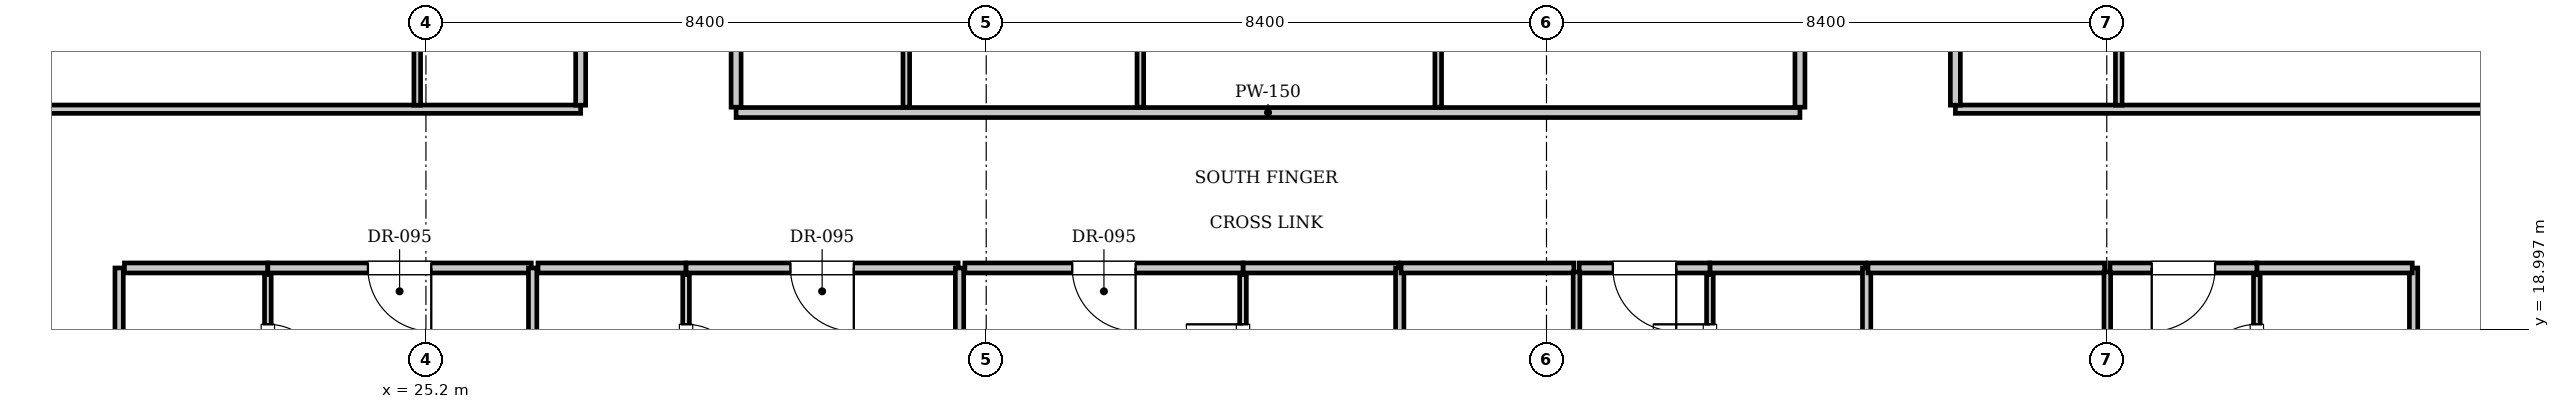
"""IFC4 building model, lengths in metres.
Left out: names, types, materials, properties, quantities, classifications, styles, units other than length and angle.
Written with IfcOpenShell. Run it as: python <this file> out.ifc"""

import sys

from ifc_helpers import new_model, si_unit, direction, frame, frame_2d, origin, place, context, subcontext, project, spatial, rectangle, extrude, element, fill, save


model = new_model("IFC4")
c1 = context("Model", 3, precision=1e-05, world=origin(), true_north=direction((0.0, 1.0)))
c2 = subcontext(c1, "Body", "Model", "MODEL_VIEW")
j1 = project(units=[si_unit("LENGTHUNIT", "METRE"), si_unit("PLANEANGLEUNIT", "RADIAN")], contexts=[c1])
p1 = place(None, origin())
s1 = spatial("IfcSite", under=j1, at=p1, CompositionType="ELEMENT")
p2 = place(p1, origin())
s2 = spatial("IfcBuilding", under=s1, at=p2, CompositionType="ELEMENT")
p3 = place(p2, frame((0.0, 0.0, 289.45)))
s3 = spatial("IfcBuildingStorey", under=s2, at=p3, CompositionType="ELEMENT", Elevation=289.45)
p4 = place(p3, frame((29.85, 22.25, 0.0), z_axis=(0.0, 0.0, 1.0), x_axis=(1.0, 0.0, 0.0)))
e1 = element("IfcWall", 1, at=p4, inside=s3, PredefinedType="PARTITIONING", context=c2, shape_type="SweptSolid", body=[
    extrude(rectangle(XDim=15.95, YDim=0.15, at=frame_2d((7.975, 0.0))), origin(), (0.0, 0.0, 1.0), 3.61),
])
for number, where, z_axis, x_axis in (
    (2, (29.85, 22.33, 0.0), (0.0, 0.0, 1.0), (0.0, 1.0, 0.0)),
    (3, (45.8, 22.33, 0.0), (0.0, 0.0, 1.0), (0.0, 1.0, 0.0)),
):
    element("IfcWall", number, at=place(p3, frame(where, z_axis=z_axis, x_axis=x_axis)), inside=s3, PredefinedType="PARTITIONING", context=c2, shape_type="SweptSolid", body=[
        extrude(rectangle(XDim=7.69, YDim=0.15, at=frame_2d((3.845, 0.0))), origin(), (0.0, 0.0, 1.0), 3.61),
    ])
for number, where, z_axis, x_axis in (
    (4, (32.402, 22.33, 0.0), (0.0, 0.0, 1.0), (0.0, 1.0, 0.0)),
    (5, (35.911, 22.33, 0.0), (0.0, 0.0, 1.0), (0.0, 1.0, 0.0)),
    (6, (40.377, 22.33, 0.0), (0.0, 0.0, 1.0), (0.0, 1.0, 0.0)),
):
    element("IfcWall", number, at=place(p3, frame(where, z_axis=z_axis, x_axis=x_axis)), inside=s3, PredefinedType="PARTITIONING", context=c2, shape_type="SweptSolid", body=[
        extrude(rectangle(XDim=7.69, YDim=0.1, at=frame_2d((3.845, 0.0))), origin(), (0.0, 0.0, 1.0), 3.61),
    ])
for number, where, z_axis, x_axis in (
    (7, (20.6, 14.4, 0.0), (0.0, 0.0, 1.0), (0.0, 1.0, 0.0)),
    (8, (55.0, 14.4, 0.0), (0.0, 0.0, 1.0), (0.0, 1.0, 0.0)),
):
    element("IfcWall", number, at=place(p3, frame(where, z_axis=z_axis, x_axis=x_axis)), inside=s3, PredefinedType="PARTITIONING", context=c2, shape_type="SweptSolid", body=[
        extrude(rectangle(XDim=5.52, YDim=0.125, at=frame_2d((2.76, 0.0))), origin(), (0.0, 0.0, 1.0), 3.61),
    ])
p5 = place(p3, frame((20.68, 19.92, 0.0), z_axis=(0.0, 0.0, 1.0), x_axis=(1.0, 0.0, 0.0)))
e9 = element("IfcWall", 9, at=p5, inside=s3, PredefinedType="PARTITIONING", context=c2, shape_type="SweptSolid", body=[
    extrude(rectangle(XDim=2.15, YDim=0.15, at=frame_2d((1.075, 0.0))), origin(), (0.0, 0.0, 1.0), 3.61),
])
p6 = place(p3, frame((22.83, 17.48, 0.0), z_axis=(0.0, 0.0, 1.0), x_axis=(0.0, 1.0, 0.0)))
e10 = element("IfcWall", 10, at=p6, inside=s3, PredefinedType="PARTITIONING", context=c2, shape_type="SweptSolid", body=[
    extrude(rectangle(XDim=2.34, YDim=0.1, at=frame_2d((1.17, 0.0))), origin(), (0.0, 0.0, 1.0), 3.61),
])
p7 = place(p6, frame((0.745, 0.0, 0.0)))
e11 = element("IfcOpeningElement", 11, at=p7, cuts=e10, PredefinedType="OPENING", context=c2, shape_type="SweptSolid", body=[
    extrude(rectangle(XDim=0.85, YDim=2.1, at=frame_2d((0.425, 1.05))), frame((0.0, 0.06, 0.0), z_axis=(0.0, -1.0, 0.0), x_axis=(1.0, 0.0, 0.0)), (0.0, 0.0, 1.0), 0.12),
])
p8 = place(p3, frame((22.83, 19.92, 0.0), z_axis=(0.0, 0.0, 1.0), x_axis=(1.0, 0.0, 0.0)))
e12 = element("IfcWall", 12, at=p8, inside=s3, PredefinedType="PARTITIONING", context=c2, shape_type="SweptSolid", body=[
    extrude(rectangle(XDim=3.95, YDim=0.15, at=frame_2d((1.975, 0.0))), origin(), (0.0, 0.0, 1.0), 3.61),
])
p9 = place(p8, frame((1.5, 0.0, 0.0)))
e13 = element("IfcOpeningElement", 13, at=p9, cuts=e12, PredefinedType="OPENING", context=c2, shape_type="SweptSolid", body=[
    extrude(rectangle(XDim=0.95, YDim=2.15, at=frame_2d((0.475, 1.075))), frame((0.0, 0.085, 0.0), z_axis=(0.0, -1.0, 0.0), x_axis=(1.0, 0.0, 0.0)), (0.0, 0.0, 1.0), 0.17),
])
p10 = place(p3, frame((26.8, 9.3, 0.0), z_axis=(0.0, 0.0, 1.0), x_axis=(0.0, 1.0, 0.0)))
e14 = element("IfcWall", 14, at=p10, inside=s3, PredefinedType="PARTITIONING", context=c2, shape_type="SweptSolid", body=[
    extrude(rectangle(XDim=10.62, YDim=0.125, at=frame_2d((5.31, 0.0))), origin(), (0.0, 0.0, 1.0), 3.61),
])
p11 = place(p3, frame((26.88, 19.92, 0.0), z_axis=(0.0, 0.0, 1.0), x_axis=(1.0, 0.0, 0.0)))
e15 = element("IfcWall", 15, at=p11, inside=s3, PredefinedType="PARTITIONING", context=c2, shape_type="SweptSolid", body=[
    extrude(rectangle(XDim=2.22, YDim=0.15, at=frame_2d((1.11, 0.0))), origin(), (0.0, 0.0, 1.0), 3.61),
])
p12 = place(p3, frame((29.1, 17.48, 0.0), z_axis=(0.0, 0.0, 1.0), x_axis=(0.0, 1.0, 0.0)))
e16 = element("IfcWall", 16, at=p12, inside=s3, PredefinedType="PARTITIONING", context=c2, shape_type="SweptSolid", body=[
    extrude(rectangle(XDim=2.34, YDim=0.1, at=frame_2d((1.17, 0.0))), origin(), (0.0, 0.0, 1.0), 3.61),
])
p13 = place(p12, frame((0.745, 0.0, 0.0)))
e17 = element("IfcOpeningElement", 17, at=p13, cuts=e16, PredefinedType="OPENING", context=c2, shape_type="SweptSolid", body=[
    extrude(rectangle(XDim=0.85, YDim=2.1, at=frame_2d((0.425, 1.05))), frame((0.0, 0.06, 0.0), z_axis=(0.0, -1.0, 0.0), x_axis=(1.0, 0.0, 0.0)), (0.0, 0.0, 1.0), 0.12),
])
p14 = place(p3, frame((29.1, 19.92, 0.0), z_axis=(0.0, 0.0, 1.0), x_axis=(1.0, 0.0, 0.0)))
e18 = element("IfcWall", 18, at=p14, inside=s3, PredefinedType="PARTITIONING", context=c2, shape_type="SweptSolid", body=[
    extrude(rectangle(XDim=4.08, YDim=0.15, at=frame_2d((2.04, 0.0))), origin(), (0.0, 0.0, 1.0), 3.61),
])
p15 = place(p14, frame((1.565, 0.0, 0.0)))
e19 = element("IfcOpeningElement", 19, at=p15, cuts=e18, PredefinedType="OPENING", context=c2, shape_type="SweptSolid", body=[
    extrude(rectangle(XDim=0.95, YDim=2.15, at=frame_2d((0.475, 1.075))), frame((0.0, 0.085, 0.0), z_axis=(0.0, -1.0, 0.0), x_axis=(1.0, 0.0, 0.0)), (0.0, 0.0, 1.0), 0.17),
])
p16 = place(p3, frame((33.2, 9.3, 0.0), z_axis=(0.0, 0.0, 1.0), x_axis=(0.0, 1.0, 0.0)))
e20 = element("IfcWall", 20, at=p16, inside=s3, PredefinedType="PARTITIONING", context=c2, shape_type="SweptSolid", body=[
    extrude(rectangle(XDim=10.62, YDim=0.125, at=frame_2d((5.31, 0.0))), origin(), (0.0, 0.0, 1.0), 3.61),
])
p17 = place(p3, frame((37.45, 19.92, 0.0), z_axis=(0.0, 0.0, 1.0), x_axis=(1.0, 0.0, 0.0)))
e21 = element("IfcWall", 21, at=p17, inside=s3, PredefinedType="PARTITIONING", context=c2, shape_type="SweptSolid", body=[
    extrude(rectangle(XDim=2.33, YDim=0.15, at=frame_2d((1.165, 0.0))), origin(), (0.0, 0.0, 1.0), 3.61),
])
p18 = place(p3, frame((37.45, 17.48, 0.0), z_axis=(0.0, 0.0, 1.0), x_axis=(0.0, 1.0, 0.0)))
e22 = element("IfcWall", 22, at=p18, inside=s3, PredefinedType="PARTITIONING", context=c2, shape_type="SweptSolid", body=[
    extrude(rectangle(XDim=2.34, YDim=0.1, at=frame_2d((1.17, 0.0))), origin(), (0.0, 0.0, 1.0), 3.61),
])
p19 = place(p18, frame((0.745, 0.0, 0.0)))
e23 = element("IfcOpeningElement", 23, at=p19, cuts=e22, PredefinedType="OPENING", context=c2, shape_type="SweptSolid", body=[
    extrude(rectangle(XDim=0.85, YDim=2.1, at=frame_2d((0.425, 1.05))), frame((0.0, 0.06, 0.0), z_axis=(0.0, -1.0, 0.0), x_axis=(1.0, 0.0, 0.0)), (0.0, 0.0, 1.0), 0.12),
])
p20 = place(p3, frame((33.28, 19.92, 0.0), z_axis=(0.0, 0.0, 1.0), x_axis=(1.0, 0.0, 0.0)))
e24 = element("IfcWall", 24, at=p20, inside=s3, PredefinedType="PARTITIONING", context=c2, shape_type="SweptSolid", body=[
    extrude(rectangle(XDim=4.17, YDim=0.15, at=frame_2d((2.085, 0.0))), origin(), (0.0, 0.0, 1.0), 3.61),
])
p21 = place(p20, frame((1.61, 0.0, 0.0)))
e25 = element("IfcOpeningElement", 25, at=p21, cuts=e24, PredefinedType="OPENING", context=c2, shape_type="SweptSolid", body=[
    extrude(rectangle(XDim=0.95, YDim=2.15, at=frame_2d((0.475, 1.075))), frame((0.0, 0.085, 0.0), z_axis=(0.0, -1.0, 0.0), x_axis=(1.0, 0.0, 0.0)), (0.0, 0.0, 1.0), 0.17),
])
p22 = place(p3, frame((39.8, 9.3, 0.0), z_axis=(0.0, 0.0, 1.0), x_axis=(0.0, 1.0, 0.0)))
e26 = element("IfcWall", 26, at=p22, inside=s3, PredefinedType="PARTITIONING", context=c2, shape_type="SweptSolid", body=[
    extrude(rectangle(XDim=10.62, YDim=0.125, at=frame_2d((5.31, 0.0))), origin(), (0.0, 0.0, 1.0), 3.61),
])
p23 = place(p3, frame((44.45, 19.92, 0.0), z_axis=(0.0, 0.0, 1.0), x_axis=(1.0, 0.0, 0.0)))
e27 = element("IfcWall", 27, at=p23, inside=s3, PredefinedType="PARTITIONING", context=c2, shape_type="SweptSolid", body=[
    extrude(rectangle(XDim=2.33, YDim=0.15, at=frame_2d((1.165, 0.0))), origin(), (0.0, 0.0, 1.0), 3.61),
])
p24 = place(p3, frame((44.45, 17.48, 0.0), z_axis=(0.0, 0.0, 1.0), x_axis=(0.0, 1.0, 0.0)))
e28 = element("IfcWall", 28, at=p24, inside=s3, PredefinedType="PARTITIONING", context=c2, shape_type="SweptSolid", body=[
    extrude(rectangle(XDim=2.34, YDim=0.1, at=frame_2d((1.17, 0.0))), origin(), (0.0, 0.0, 1.0), 3.61),
])
p25 = place(p24, frame((0.745, 0.0, 0.0)))
e29 = element("IfcOpeningElement", 29, at=p25, cuts=e28, PredefinedType="OPENING", context=c2, shape_type="SweptSolid", body=[
    extrude(rectangle(XDim=0.85, YDim=2.1, at=frame_2d((0.425, 1.05))), frame((0.0, 0.06, 0.0), z_axis=(0.0, -1.0, 0.0), x_axis=(1.0, 0.0, 0.0)), (0.0, 0.0, 1.0), 0.12),
])
p26 = place(p3, frame((39.82, 19.92, 0.0), z_axis=(0.0, 0.0, 1.0), x_axis=(1.0, 0.0, 0.0)))
e30 = element("IfcWall", 30, at=p26, inside=s3, PredefinedType="PARTITIONING", context=c2, shape_type="SweptSolid", body=[
    extrude(rectangle(XDim=2.59, YDim=0.15, at=frame_2d((1.295, 0.0))), origin(), (0.0, 0.0, 1.0), 3.61),
])
p27 = place(p3, frame((42.49, 19.92, 0.0), z_axis=(0.0, 0.0, 1.0), x_axis=(1.0, 0.0, 0.0)))
e31 = element("IfcWall", 31, at=p27, inside=s3, PredefinedType="PARTITIONING", context=c2, shape_type="SweptSolid", body=[
    extrude(rectangle(XDim=1.96, YDim=0.15, at=frame_2d((0.98, 0.0))), origin(), (0.0, 0.0, 1.0), 3.61),
])
p28 = place(p27, frame((0.505, 0.0, 0.0)))
e32 = element("IfcOpeningElement", 32, at=p28, cuts=e31, PredefinedType="OPENING", context=c2, shape_type="SweptSolid", body=[
    extrude(rectangle(XDim=0.95, YDim=2.15, at=frame_2d((0.475, 1.075))), frame((0.0, 0.085, 0.0), z_axis=(0.0, -1.0, 0.0), x_axis=(1.0, 0.0, 0.0)), (0.0, 0.0, 1.0), 0.17),
])
p29 = place(p3, frame((42.45, 9.23, 0.0), z_axis=(0.0, 0.0, 1.0), x_axis=(0.0, 1.0, 0.0)))
e33 = element("IfcWall", 33, at=p29, inside=s3, PredefinedType="PARTITIONING", context=c2, shape_type="SweptSolid", body=[
    extrude(rectangle(XDim=10.63, YDim=0.1, at=frame_2d((5.315, 0.0))), origin(), (0.0, 0.0, 1.0), 3.61),
])
p30 = place(p29, frame((1.6, 0.0, 0.0)))
e34 = element("IfcOpeningElement", 34, at=p30, cuts=e33, PredefinedType="OPENING", context=c2, shape_type="SweptSolid", body=[
    extrude(rectangle(XDim=0.9, YDim=2.1, at=frame_2d((0.45, 1.05))), frame((0.0, 0.06, 0.0), z_axis=(0.0, -1.0, 0.0), x_axis=(1.0, 0.0, 0.0)), (0.0, 0.0, 1.0), 0.12),
])
p31 = place(p3, frame((46.8, 9.3, 0.0), z_axis=(0.0, 0.0, 1.0), x_axis=(0.0, 1.0, 0.0)))
e35 = element("IfcWall", 35, at=p31, inside=s3, PredefinedType="PARTITIONING", context=c2, shape_type="SweptSolid", body=[
    extrude(rectangle(XDim=10.62, YDim=0.125, at=frame_2d((5.31, 0.0))), origin(), (0.0, 0.0, 1.0), 3.61),
])
p32 = place(p3, frame((52.65, 19.92, 0.0), z_axis=(0.0, 0.0, 1.0), x_axis=(1.0, 0.0, 0.0)))
e36 = element("IfcWall", 36, at=p32, inside=s3, PredefinedType="PARTITIONING", context=c2, shape_type="SweptSolid", body=[
    extrude(rectangle(XDim=2.33, YDim=0.15, at=frame_2d((1.165, 0.0))), origin(), (0.0, 0.0, 1.0), 3.61),
])
p33 = place(p3, frame((52.65, 17.48, 0.0), z_axis=(0.0, 0.0, 1.0), x_axis=(0.0, 1.0, 0.0)))
e37 = element("IfcWall", 37, at=p33, inside=s3, PredefinedType="PARTITIONING", context=c2, shape_type="SweptSolid", body=[
    extrude(rectangle(XDim=2.34, YDim=0.1, at=frame_2d((1.17, 0.0))), origin(), (0.0, 0.0, 1.0), 3.61),
])
p34 = place(p33, frame((0.745, 0.0, 0.0)))
e38 = element("IfcOpeningElement", 38, at=p34, cuts=e37, PredefinedType="OPENING", context=c2, shape_type="SweptSolid", body=[
    extrude(rectangle(XDim=0.85, YDim=2.1, at=frame_2d((0.425, 1.05))), frame((0.0, 0.06, 0.0), z_axis=(0.0, -1.0, 0.0), x_axis=(1.0, 0.0, 0.0)), (0.0, 0.0, 1.0), 0.12),
])
p35 = place(p3, frame((46.82, 19.92, 0.0), z_axis=(0.0, 0.0, 1.0), x_axis=(1.0, 0.0, 0.0)))
e39 = element("IfcWall", 39, at=p35, inside=s3, PredefinedType="PARTITIONING", context=c2, shape_type="SweptSolid", body=[
    extrude(rectangle(XDim=3.548, YDim=0.15, at=frame_2d((1.774, 0.0))), origin(), (0.0, 0.0, 1.0), 3.61),
])
p36 = place(p3, frame((50.448, 19.92, 0.0), z_axis=(0.0, 0.0, 1.0), x_axis=(1.0, 0.0, 0.0)))
e40 = element("IfcWall", 40, at=p36, inside=s3, PredefinedType="PARTITIONING", context=c2, shape_type="SweptSolid", body=[
    extrude(rectangle(XDim=2.202, YDim=0.15, at=frame_2d((1.101, 0.0))), origin(), (0.0, 0.0, 1.0), 3.61),
])
p37 = place(p36, frame((0.626, 0.0, 0.0)))
e41 = element("IfcOpeningElement", 41, at=p37, cuts=e40, PredefinedType="OPENING", context=c2, shape_type="SweptSolid", body=[
    extrude(rectangle(XDim=0.95, YDim=2.15, at=frame_2d((0.475, 1.075))), frame((0.0, 0.085, 0.0), z_axis=(0.0, -1.0, 0.0), x_axis=(1.0, 0.0, 0.0)), (0.0, 0.0, 1.0), 0.17),
])
p38 = place(p3, frame((50.408, 9.23, 0.0), z_axis=(0.0, 0.0, 1.0), x_axis=(0.0, 1.0, 0.0)))
e42 = element("IfcWall", 42, at=p38, inside=s3, PredefinedType="PARTITIONING", context=c2, shape_type="SweptSolid", body=[
    extrude(rectangle(XDim=10.63, YDim=0.1, at=frame_2d((5.315, 0.0))), origin(), (0.0, 0.0, 1.0), 3.081),
])
p39 = place(p38, frame((1.6, 0.0, 0.0)))
e43 = element("IfcOpeningElement", 43, at=p39, cuts=e42, PredefinedType="OPENING", context=c2, shape_type="SweptSolid", body=[
    extrude(rectangle(XDim=0.9, YDim=2.1, at=frame_2d((0.45, 1.05))), frame((0.0, 0.06, 0.0), z_axis=(0.0, -1.0, 0.0), x_axis=(1.0, 0.0, 0.0)), (0.0, 0.0, 1.0), 0.12),
])
p40 = place(p3, frame((15.5, 22.3, 0.0), z_axis=(0.0, 0.0, 1.0), x_axis=(1.0, 0.0, 0.0)))
e44 = element("IfcWall", 44, at=p40, inside=s3, PredefinedType="PARTITIONING", context=c2, shape_type="SweptSolid", body=[
    extrude(rectangle(XDim=12.02, YDim=0.125, at=frame_2d((6.01, 0.0))), origin(), (0.0, 0.0, 1.0), 3.61),
])
p41 = place(p3, frame((48.13, 22.3, 0.0), z_axis=(0.0, 0.0, 1.0), x_axis=(1.0, 0.0, 0.0)))
e45 = element("IfcWall", 45, at=p41, inside=s3, PredefinedType="PARTITIONING", context=c2, shape_type="SweptSolid", body=[
    extrude(rectangle(XDim=11.97, YDim=0.125, at=frame_2d((5.985, 0.0))), origin(), (0.0, 0.0, 1.0), 3.61),
])
p42 = place(p3, frame((27.52, 22.36, 0.0), z_axis=(0.0, 0.0, 1.0), x_axis=(0.0, 1.0, 0.0)))
e46 = element("IfcWall", 46, at=p42, inside=s3, PredefinedType="PARTITIONING", context=c2, shape_type="SweptSolid", body=[
    extrude(rectangle(XDim=1.89, YDim=0.15, at=frame_2d((0.945, 0.0))), origin(), (0.0, 0.0, 1.0), 3.61),
])
p43 = place(p3, frame((25.07, 22.36, 0.0), z_axis=(0.0, 0.0, 1.0), x_axis=(0.0, 1.0, 0.0)))
e47 = element("IfcWall", 47, at=p43, inside=s3, PredefinedType="PARTITIONING", context=c2, shape_type="SweptSolid", body=[
    extrude(rectangle(XDim=1.89, YDim=0.1, at=frame_2d((0.945, 0.0))), origin(), (0.0, 0.0, 1.0), 3.61),
])
p44 = place(p3, frame((48.13, 22.36, 0.0), z_axis=(0.0, 0.0, 1.0), x_axis=(0.0, 1.0, 0.0)))
e48 = element("IfcWall", 48, at=p44, inside=s3, PredefinedType="PARTITIONING", context=c2, shape_type="SweptSolid", body=[
    extrude(rectangle(XDim=1.89, YDim=0.15, at=frame_2d((0.945, 0.0))), origin(), (0.0, 0.0, 1.0), 3.61),
])
p45 = place(p3, frame((50.58, 22.36, 0.0), z_axis=(0.0, 0.0, 1.0), x_axis=(0.0, 1.0, 0.0)))
e49 = element("IfcWall", 49, at=p45, inside=s3, PredefinedType="PARTITIONING", context=c2, shape_type="SweptSolid", body=[
    extrude(rectangle(XDim=1.89, YDim=0.1, at=frame_2d((0.945, 0.0))), origin(), (0.0, 0.0, 1.0), 3.61),
])
p46 = place(p7, frame((0.85, 0.0, 0.0), z_axis=(0.0, 0.0, 1.0), x_axis=(-1.0, 0.0, 0.0)))
e50 = element("IfcDoor", 50, at=p46, inside=s3, OperationType="SINGLE_SWING_RIGHT", PredefinedType="DOOR", context=c2, shape_type="SweptSolid", body=[
    extrude(rectangle(XDim=0.85, YDim=2.1, at=frame_2d((0.425, 1.05))), frame((0.0, 0.025, 0.0), z_axis=(0.0, -1.0, 0.0), x_axis=(1.0, 0.0, 0.0)), (0.0, 0.0, 1.0), 0.05),
])
fill(e11, e50)
p47 = place(p9, frame((0.95, 0.0, 0.0), z_axis=(0.0, 0.0, 1.0), x_axis=(-1.0, 0.0, 0.0)))
e51 = element("IfcDoor", 51, at=p47, inside=s3, OperationType="SINGLE_SWING_LEFT", PredefinedType="DOOR", context=c2, shape_type="SweptSolid", body=[
    extrude(rectangle(XDim=0.95, YDim=2.15, at=frame_2d((0.475, 1.075))), frame((0.0, 0.025, 0.0), z_axis=(0.0, -1.0, 0.0), x_axis=(1.0, 0.0, 0.0)), (0.0, 0.0, 1.0), 0.05),
])
fill(e13, e51)
p48 = place(p13, frame((0.85, 0.0, 0.0), z_axis=(0.0, 0.0, 1.0), x_axis=(-1.0, 0.0, 0.0)))
e52 = element("IfcDoor", 52, at=p48, inside=s3, OperationType="SINGLE_SWING_RIGHT", PredefinedType="DOOR", context=c2, shape_type="SweptSolid", body=[
    extrude(rectangle(XDim=0.85, YDim=2.1, at=frame_2d((0.425, 1.05))), frame((0.0, 0.025, 0.0), z_axis=(0.0, -1.0, 0.0), x_axis=(1.0, 0.0, 0.0)), (0.0, 0.0, 1.0), 0.05),
])
fill(e17, e52)
p49 = place(p15, frame((0.95, 0.0, 0.0), z_axis=(0.0, 0.0, 1.0), x_axis=(-1.0, 0.0, 0.0)))
e53 = element("IfcDoor", 53, at=p49, inside=s3, OperationType="SINGLE_SWING_LEFT", PredefinedType="DOOR", context=c2, shape_type="SweptSolid", body=[
    extrude(rectangle(XDim=0.95, YDim=2.15, at=frame_2d((0.475, 1.075))), frame((0.0, 0.025, 0.0), z_axis=(0.0, -1.0, 0.0), x_axis=(1.0, 0.0, 0.0)), (0.0, 0.0, 1.0), 0.05),
])
fill(e19, e53)
p50 = place(p19, origin())
e54 = element("IfcDoor", 54, at=p50, inside=s3, OperationType="SINGLE_SWING_RIGHT", PredefinedType="DOOR", context=c2, shape_type="SweptSolid", body=[
    extrude(rectangle(XDim=0.85, YDim=2.1, at=frame_2d((0.425, 1.05))), frame((0.0, 0.025, 0.0), z_axis=(0.0, -1.0, 0.0), x_axis=(1.0, 0.0, 0.0)), (0.0, 0.0, 1.0), 0.05),
])
fill(e23, e54)
p51 = place(p21, frame((0.95, 0.0, 0.0), z_axis=(0.0, 0.0, 1.0), x_axis=(-1.0, 0.0, 0.0)))
e55 = element("IfcDoor", 55, at=p51, inside=s3, OperationType="SINGLE_SWING_LEFT", PredefinedType="DOOR", context=c2, shape_type="SweptSolid", body=[
    extrude(rectangle(XDim=0.95, YDim=2.15, at=frame_2d((0.475, 1.075))), frame((0.0, 0.025, 0.0), z_axis=(0.0, -1.0, 0.0), x_axis=(1.0, 0.0, 0.0)), (0.0, 0.0, 1.0), 0.05),
])
fill(e25, e55)
p52 = place(p25, origin())
e56 = element("IfcDoor", 56, at=p52, inside=s3, OperationType="SINGLE_SWING_RIGHT", PredefinedType="DOOR", context=c2, shape_type="SweptSolid", body=[
    extrude(rectangle(XDim=0.85, YDim=2.1, at=frame_2d((0.425, 1.05))), frame((0.0, 0.025, 0.0), z_axis=(0.0, -1.0, 0.0), x_axis=(1.0, 0.0, 0.0)), (0.0, 0.0, 1.0), 0.05),
])
fill(e29, e56)
p53 = place(p28, frame((0.95, 0.0, 0.0), z_axis=(0.0, 0.0, 1.0), x_axis=(-1.0, 0.0, 0.0)))
e57 = element("IfcDoor", 57, at=p53, inside=s3, OperationType="SINGLE_SWING_LEFT", PredefinedType="DOOR", context=c2, shape_type="SweptSolid", body=[
    extrude(rectangle(XDim=0.95, YDim=2.15, at=frame_2d((0.475, 1.075))), frame((0.0, 0.025, 0.0), z_axis=(0.0, -1.0, 0.0), x_axis=(1.0, 0.0, 0.0)), (0.0, 0.0, 1.0), 0.05),
])
fill(e32, e57)
p54 = place(p34, origin())
e58 = element("IfcDoor", 58, at=p54, inside=s3, OperationType="SINGLE_SWING_LEFT", PredefinedType="DOOR", context=c2, shape_type="SweptSolid", body=[
    extrude(rectangle(XDim=0.85, YDim=2.1, at=frame_2d((0.425, 1.05))), frame((0.0, 0.025, 0.0), z_axis=(0.0, -1.0, 0.0), x_axis=(1.0, 0.0, 0.0)), (0.0, 0.0, 1.0), 0.05),
])
fill(e38, e58)
p55 = place(p37, frame((0.95, 0.0, 0.0), z_axis=(0.0, 0.0, 1.0), x_axis=(-1.0, 0.0, 0.0)))
e59 = element("IfcDoor", 59, at=p55, inside=s3, OperationType="SINGLE_SWING_RIGHT", PredefinedType="DOOR", context=c2, shape_type="SweptSolid", body=[
    extrude(rectangle(XDim=0.95, YDim=2.15, at=frame_2d((0.475, 1.075))), frame((0.0, 0.025, 0.0), z_axis=(0.0, -1.0, 0.0), x_axis=(1.0, 0.0, 0.0)), (0.0, 0.0, 1.0), 0.05),
])
fill(e41, e59)
save(model, sys.argv[1])
